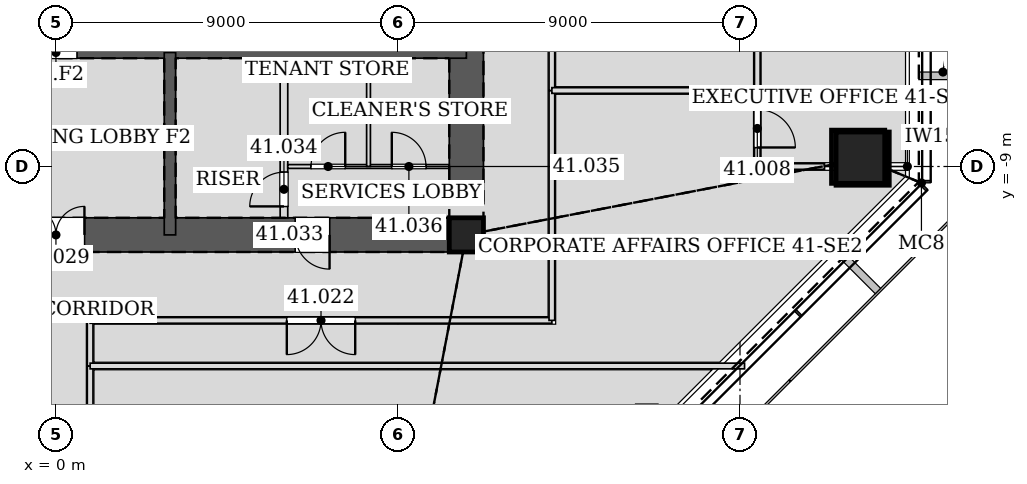
"""IFC4 building model, lengths in metres.
Left out: names, types, materials, properties, quantities, classifications, styles, units other than length and angle.
Written with IfcOpenShell. Run it as: python <this file> out.ifc"""

import sys

from ifc_helpers import new_model, si_unit, direction, frame, frame_2d, origin, origin_2d, place, context, subcontext, project, spatial, rectangle, hollow_rectangle, extrude, element, fill, save


model = new_model("IFC4")
c1 = context("Model", 3, precision=1e-05, world=origin(), true_north=direction((0.0, 1.0)))
c2 = subcontext(c1, "Body", "Model", "MODEL_VIEW")
j1 = project(units=[si_unit("LENGTHUNIT", "METRE"), si_unit("PLANEANGLEUNIT", "RADIAN")], contexts=[c1])
p1 = place(None, origin())
s1 = spatial("IfcSite", under=j1, at=p1, CompositionType="ELEMENT")
p2 = place(p1, origin())
s2 = spatial("IfcBuilding", under=s1, at=p2, CompositionType="ELEMENT")
p3 = place(p2, frame((0.0, 0.0, 180.6)))
s3 = spatial("IfcBuildingStorey", under=s2, at=p3, CompositionType="ELEMENT", Elevation=180.6)
p4 = place(p3, frame((21.228, -8.793, 0.0), z_axis=(-0.028237693676, 0.011678552323, 0.999533012997), x_axis=(-0.382183844423, -0.924086310396, 0.0)))
e1 = element("IfcColumn", 1, at=p4, inside=s3, PredefinedType="COLUMN", context=c2, shape_type="SweptSolid", body=[
    extrude(hollow_rectangle(XDim=1.4, YDim=1.4, WallThickness=0.065, at=origin_2d()), origin(), (0.0, 0.0, 1.0), 4.202),
])
p5 = place(p3, frame((15.631, -15.631, 0.0), z_axis=(-0.019988521213, 0.019988521213, 0.999600379171), x_axis=(-0.707106781187, -0.707106781187, 0.0)))
e2 = element("IfcColumn", 2, at=p5, inside=s3, PredefinedType="COLUMN", context=c2, shape_type="SweptSolid", body=[
    extrude(hollow_rectangle(XDim=0.5, YDim=0.5, WallThickness=0.025, at=origin_2d()), origin(), (0.0, 0.0, 1.0), 4.202),
])
p6 = place(p3, frame((10.8, -10.8, 0.0), z_axis=(0.0, 0.0, 1.0), x_axis=(1.0, 0.0, 0.0)))
e3 = element("IfcColumn", 3, at=p6, inside=s3, PredefinedType="COLUMN", context=c2, shape_type="SweptSolid", body=[
    extrude(hollow_rectangle(XDim=0.9, YDim=0.9, WallThickness=0.06, at=origin_2d()), origin(), (0.0, 0.0, 1.0), 4.2),
])
p7 = place(p3, frame((-10.8, -10.8, 0.0), z_axis=(0.0, 0.0, 1.0), x_axis=(1.0, 0.0, 0.0)))
e4 = element("IfcWall", 4, at=p7, inside=s3, PredefinedType="SOLIDWALL", context=c2, shape_type="SweptSolid", body=[
    extrude(rectangle(XDim=21.6, YDim=0.9, at=frame_2d((10.8, 0.0))), origin(), (0.0, 0.0, 1.0), 4.2),
])
p8 = place(p7, frame((10.05, 0.0, 0.0)))
e5 = element("IfcOpeningElement", 5, at=p8, cuts=e4, PredefinedType="OPENING", context=c2, shape_type="SweptSolid", body=[
    extrude(rectangle(XDim=1.5, YDim=2.1, at=frame_2d((0.75, 1.05))), frame((0.0, 0.46, 0.0), z_axis=(0.0, -1.0, 0.0), x_axis=(1.0, 0.0, 0.0)), (0.0, 0.0, 1.0), 0.92),
])
p9 = place(p7, frame((17.1, 0.0, 0.0)))
e6 = element("IfcOpeningElement", 6, at=p9, cuts=e4, PredefinedType="OPENING", context=c2, shape_type="SweptSolid", body=[
    extrude(rectangle(XDim=0.9, YDim=2.1, at=frame_2d((0.45, 1.05))), frame((0.0, 0.46, 0.0), z_axis=(0.0, -1.0, 0.0), x_axis=(1.0, 0.0, 0.0)), (0.0, 0.0, 1.0), 0.92),
])
p10 = place(p3, frame((10.8, -10.8, 0.0), z_axis=(0.0, 0.0, 1.0), x_axis=(0.0, 1.0, 0.0)))
e7 = element("IfcWall", 7, at=p10, inside=s3, PredefinedType="SOLIDWALL", context=c2, shape_type="SweptSolid", body=[
    extrude(rectangle(XDim=21.6, YDim=0.9, at=frame_2d((10.8, 0.0))), origin(), (0.0, 0.0, 1.0), 4.2),
])
p11 = place(p10, frame((11.7, 0.0, 0.0)))
e8 = element("IfcOpeningElement", 8, at=p11, cuts=e7, PredefinedType="OPENING", context=c2, shape_type="SweptSolid", body=[
    extrude(rectangle(XDim=1.2, YDim=2.1, at=frame_2d((0.6, 1.05))), frame((0.0, 0.46, 0.0), z_axis=(0.0, -1.0, 0.0), x_axis=(1.0, 0.0, 0.0)), (0.0, 0.0, 1.0), 0.92),
])
p12 = place(p10, frame((8.7, 0.0, 0.0)))
e9 = element("IfcOpeningElement", 9, at=p12, cuts=e7, PredefinedType="OPENING", context=c2, shape_type="SweptSolid", body=[
    extrude(rectangle(XDim=1.2, YDim=2.1, at=frame_2d((0.6, 1.05))), frame((0.0, 0.46, 0.0), z_axis=(0.0, -1.0, 0.0), x_axis=(1.0, 0.0, 0.0)), (0.0, 0.0, 1.0), 0.92),
])
p13 = place(p3, frame((-10.8, -6.0, 0.0), z_axis=(0.0, 0.0, 1.0), x_axis=(1.0, 0.0, 0.0)))
e10 = element("IfcWall", 10, at=p13, inside=s3, PredefinedType="SOLIDWALL", context=c2, shape_type="SweptSolid", body=[
    extrude(rectangle(XDim=21.6, YDim=0.3, at=frame_2d((10.8, 0.0))), origin(), (0.0, 0.0, 1.0), 4.2),
])
p14 = place(p13, frame((10.25, 0.0, 0.0)))
e11 = element("IfcOpeningElement", 11, at=p14, cuts=e10, PredefinedType="OPENING", context=c2, shape_type="SweptSolid", body=[
    extrude(rectangle(XDim=1.1, YDim=2.1, at=frame_2d((0.55, 1.05))), frame((0.0, 0.16, 0.0), z_axis=(0.0, -1.0, 0.0), x_axis=(1.0, 0.0, 0.0)), (0.0, 0.0, 1.0), 0.32),
])
p15 = place(p3, frame((3.0, -6.0, 0.0), z_axis=(0.0, 0.0, 1.0), x_axis=(0.0, -1.0, 0.0)))
e12 = element("IfcWall", 12, at=p15, inside=s3, PredefinedType="SOLIDWALL", context=c2, shape_type="SweptSolid", body=[
    extrude(rectangle(XDim=4.8, YDim=0.3, at=frame_2d((2.4, 0.0))), origin(), (0.0, 0.0, 1.0), 4.2),
])
p16 = place(p3, frame((0.9, -22.89, 0.0), z_axis=(0.0, 0.0, 1.0), x_axis=(0.0, 1.0, 0.0)))
e13 = element("IfcWall", 13, at=p16, inside=s3, PredefinedType="PARTITIONING", context=c2, shape_type="SweptSolid", body=[
    extrude(rectangle(XDim=8.641, YDim=0.15, at=frame_2d((4.32, 0.0))), origin(), (0.0, 0.0, 1.0), 3.426),
])
p17 = place(p16, frame((4.702, 0.0, 0.0)))
e14 = element("IfcOpeningElement", 14, at=p17, cuts=e13, PredefinedType="OPENING", context=c2, shape_type="SweptSolid", body=[
    extrude(rectangle(XDim=1.8, YDim=2.4, at=frame_2d((0.9, 1.2))), frame((0.0, 0.085, 0.0), z_axis=(0.0, -1.0, 0.0), x_axis=(1.0, 0.0, 0.0)), (0.0, 0.0, 1.0), 0.17),
])
p18 = place(p3, frame((0.9, -14.251, 0.0), z_axis=(0.0, 0.0, 1.0), x_axis=(0.0, 1.0, 0.0)))
e15 = element("IfcWall", 15, at=p18, inside=s3, PredefinedType="PARTITIONING", context=c2, shape_type="SweptSolid", body=[
    extrude(rectangle(XDim=1.201, YDim=0.15, at=frame_2d((0.601, 0.0))), origin(), (0.0, 0.0, 1.0), 3.426),
])
p19 = place(p3, frame((0.9, -13.05, 0.0), z_axis=(0.0, 0.0, 1.0), x_axis=(1.0, 0.0, 0.0)))
e16 = element("IfcWall", 16, at=p19, inside=s3, PredefinedType="PARTITIONING", context=c2, shape_type="SweptSolid", body=[
    extrude(rectangle(XDim=12.15, YDim=0.15, at=frame_2d((6.075, 0.0))), origin(), (0.0, 0.0, 1.0), 3.167),
])
p20 = place(p19, frame((5.175, 0.0, 0.0)))
e17 = element("IfcOpeningElement", 17, at=p20, cuts=e16, PredefinedType="OPENING", context=c2, shape_type="SweptSolid", body=[
    extrude(rectangle(XDim=1.8, YDim=2.4, at=frame_2d((0.9, 1.2))), frame((0.0, 0.085, 0.0), z_axis=(0.0, -1.0, 0.0), x_axis=(1.0, 0.0, 0.0)), (0.0, 0.0, 1.0), 0.17),
])
p21 = place(p3, frame((13.05, -13.05, 0.0), z_axis=(0.0, 0.0, 1.0), x_axis=(0.0, 1.0, 0.0)))
e18 = element("IfcWall", 18, at=p21, inside=s3, PredefinedType="PARTITIONING", context=c2, shape_type="SweptSolid", body=[
    extrude(rectangle(XDim=6.051, YDim=0.15, at=frame_2d((3.025, 0.0))), origin(), (0.0, 0.0, 1.0), 3.167),
])
p22 = place(p3, frame((13.05, -7.001, 0.0), z_axis=(0.0, 0.0, 1.0), x_axis=(0.0, 1.0, 0.0)))
e19 = element("IfcWall", 19, at=p22, inside=s3, PredefinedType="PARTITIONING", context=c2, shape_type="SweptSolid", body=[
    extrude(rectangle(XDim=2.502, YDim=0.15, at=frame_2d((1.251, 0.0))), origin(), (0.0, 0.0, 1.0), 4.035),
])
p23 = place(p3, frame((18.456, -6.999, 0.0), z_axis=(0.0, 0.0, 1.0), x_axis=(0.0, -1.0, 0.0)))
e20 = element("IfcWall", 20, at=p23, inside=s3, PredefinedType="PARTITIONING", context=c2, shape_type="SweptSolid", body=[
    extrude(rectangle(XDim=2.001, YDim=0.15, at=frame_2d((1.0, 0.0))), origin(), (0.0, 0.0, 1.0), 4.035),
])
p24 = place(p23, frame((0.5, 0.0, 0.0)))
e21 = element("IfcOpeningElement", 21, at=p24, cuts=e20, PredefinedType="OPENING", context=c2, shape_type="SweptSolid", body=[
    extrude(rectangle(XDim=1.0, YDim=2.1, at=frame_2d((0.5, 1.05))), frame((0.0, 0.085, 0.0), z_axis=(0.0, -1.0, 0.0), x_axis=(1.0, 0.0, 0.0)), (0.0, 0.0, 1.0), 0.17),
])
p25 = place(p3, frame((18.456, -9.0, 0.0), z_axis=(0.0, 0.0, 1.0), x_axis=(1.0, 0.0, 0.0)))
e22 = element("IfcWall", 22, at=p25, inside=s3, PredefinedType="PARTITIONING", context=c2, shape_type="SweptSolid", body=[
    extrude(rectangle(XDim=1.768, YDim=0.15, at=frame_2d((0.884, 0.0))), origin(), (0.0, 0.0, 1.0), 3.167),
])
p26 = place(p3, frame((21.92, -9.0, 0.0), z_axis=(0.0, 0.0, 1.0), x_axis=(1.0, 0.0, 0.0)))
e23 = element("IfcWall", 23, at=p26, inside=s3, PredefinedType="PARTITIONING", context=c2, shape_type="SweptSolid", body=[
    extrude(rectangle(XDim=0.967, YDim=0.15, at=frame_2d((0.484, 0.0))), origin(), (0.0, 0.0, 1.0), 4.035),
])
p27 = place(p3, frame((18.456, -7.001, 0.0), z_axis=(0.0, 0.0, 1.0), x_axis=(0.0, 1.0, 0.0)))
e24 = element("IfcWall", 24, at=p27, inside=s3, PredefinedType="PARTITIONING", context=c2, shape_type="SweptSolid", body=[
    extrude(rectangle(XDim=5.201, YDim=0.15, at=frame_2d((2.601, 0.0))), origin(), (0.0, 0.0, 1.0), 4.035),
])
p28 = place(p3, frame((18.12, -14.25, 0.0), z_axis=(0.0, 0.0, 1.0), x_axis=(-1.0, 0.0, 0.0)))
e25 = element("IfcWall", 25, at=p28, inside=s3, PredefinedType="PARTITIONING", context=c2, shape_type="SweptSolid", body=[
    extrude(rectangle(XDim=17.22, YDim=0.15, at=frame_2d((8.61, 0.0))), origin(), (0.0, 0.0, 1.0), 3.167),
])
p29 = place(p3, frame((18.456, -7.0, 0.0), z_axis=(0.0, 0.0, 1.0), x_axis=(-1.0, 0.0, 0.0)))
e26 = element("IfcWall", 26, at=p29, inside=s3, PredefinedType="PARTITIONING", context=c2, shape_type="SweptSolid", body=[
    extrude(rectangle(XDim=5.406, YDim=0.15, at=frame_2d((2.703, 0.0))), origin(), (0.0, 0.0, 1.0), 3.426),
])
p30 = place(p3, frame((6.0, -10.35, 0.0), z_axis=(0.0, 0.0, 1.0), x_axis=(0.0, 1.0, 0.0)))
e27 = element("IfcWall", 27, at=p30, inside=s3, PredefinedType="PARTITIONING", context=c2, shape_type="SweptSolid", body=[
    extrude(rectangle(XDim=4.2, YDim=0.2, at=frame_2d((2.1, 0.0))), origin(), (0.0, 0.0, 1.0), 4.035),
])
p31 = place(p30, frame((0.3, 0.0, 0.0)))
e28 = element("IfcOpeningElement", 28, at=p31, cuts=e27, PredefinedType="OPENING", context=c2, shape_type="SweptSolid", body=[
    extrude(rectangle(XDim=0.9, YDim=2.1, at=frame_2d((0.45, 1.05))), frame((0.0, 0.11, 0.0), z_axis=(0.0, -1.0, 0.0), x_axis=(1.0, 0.0, 0.0)), (0.0, 0.0, 1.0), 0.22),
])
p32 = place(p3, frame((6.1, -9.0, 0.0), z_axis=(0.0, 0.0, 1.0), x_axis=(1.0, 0.0, 0.0)))
e29 = element("IfcWall", 29, at=p32, inside=s3, PredefinedType="PARTITIONING", context=c2, shape_type="SweptSolid", body=[
    extrude(rectangle(XDim=4.25, YDim=0.1, at=frame_2d((2.125, 0.0))), origin(), (0.0, 0.0, 1.0), 4.035),
])
p33 = place(p32, frame((0.613, 0.0, 0.0)))
e30 = element("IfcOpeningElement", 30, at=p33, cuts=e29, PredefinedType="OPENING", context=c2, shape_type="SweptSolid", body=[
    extrude(rectangle(XDim=0.9, YDim=2.1, at=frame_2d((0.45, 1.05))), frame((0.0, 0.06, 0.0), z_axis=(0.0, -1.0, 0.0), x_axis=(1.0, 0.0, 0.0)), (0.0, 0.0, 1.0), 0.12),
])
p34 = place(p32, frame((2.738, 0.0, 0.0)))
e31 = element("IfcOpeningElement", 31, at=p34, cuts=e29, PredefinedType="OPENING", context=c2, shape_type="SweptSolid", body=[
    extrude(rectangle(XDim=0.9, YDim=2.1, at=frame_2d((0.45, 1.05))), frame((0.0, 0.06, 0.0), z_axis=(0.0, -1.0, 0.0), x_axis=(1.0, 0.0, 0.0)), (0.0, 0.0, 1.0), 0.12),
])
p35 = place(p3, frame((8.225, -9.0, 0.0), z_axis=(0.0, 0.0, 1.0), x_axis=(0.0, 1.0, 0.0)))
e32 = element("IfcWall", 32, at=p35, inside=s3, PredefinedType="PARTITIONING", context=c2, shape_type="SweptSolid", body=[
    extrude(rectangle(XDim=2.85, YDim=0.1, at=frame_2d((1.425, 0.0))), origin(), (0.0, 0.0, 1.0), 4.035),
])
p36 = place(p24, origin())
e33 = element("IfcDoor", 33, at=p36, inside=s3, OperationType="SINGLE_SWING_RIGHT", PredefinedType="DOOR", context=c2, shape_type="SweptSolid", body=[
    extrude(rectangle(XDim=1.0, YDim=2.1, at=frame_2d((0.5, 1.05))), frame((0.0, 0.025, 0.0), z_axis=(0.0, -1.0, 0.0), x_axis=(1.0, 0.0, 0.0)), (0.0, 0.0, 1.0), 0.05),
])
fill(e21, e33)
p37 = place(p20, frame((1.8, 0.0, 0.0), z_axis=(0.0, 0.0, 1.0), x_axis=(-1.0, 0.0, 0.0)))
e34 = element("IfcDoor", 34, at=p37, inside=s3, OperationType="DOUBLE_DOOR_SINGLE_SWING", PredefinedType="DOOR", context=c2, shape_type="SweptSolid", body=[
    extrude(rectangle(XDim=1.8, YDim=2.4, at=frame_2d((0.9, 1.2))), frame((0.0, 0.025, 0.0), z_axis=(0.0, -1.0, 0.0), x_axis=(1.0, 0.0, 0.0)), (0.0, 0.0, 1.0), 0.05),
])
fill(e17, e34)
p38 = place(p8, origin())
e35 = element("IfcDoor", 35, at=p38, inside=s3, OperationType="DOUBLE_DOOR_SINGLE_SWING", PredefinedType="DOOR", context=c2, shape_type="SweptSolid", body=[
    extrude(rectangle(XDim=1.5, YDim=2.1, at=frame_2d((0.75, 1.05))), frame((0.0, 0.025, 0.0), z_axis=(0.0, -1.0, 0.0), x_axis=(1.0, 0.0, 0.0)), (0.0, 0.0, 1.0), 0.05),
])
fill(e5, e35)
p39 = place(p9, frame((0.9, 0.0, 0.0), z_axis=(0.0, 0.0, 1.0), x_axis=(-1.0, 0.0, 0.0)))
e36 = element("IfcDoor", 36, at=p39, inside=s3, OperationType="SINGLE_SWING_LEFT", PredefinedType="DOOR", context=c2, shape_type="SweptSolid", body=[
    extrude(rectangle(XDim=0.9, YDim=2.1, at=frame_2d((0.45, 1.05))), frame((0.0, 0.025, 0.0), z_axis=(0.0, -1.0, 0.0), x_axis=(1.0, 0.0, 0.0)), (0.0, 0.0, 1.0), 0.05),
])
fill(e6, e36)
p40 = place(p31, origin())
e37 = element("IfcDoor", 37, at=p40, inside=s3, OperationType="SINGLE_SWING_LEFT", PredefinedType="DOOR", context=c2, shape_type="SweptSolid", body=[
    extrude(rectangle(XDim=0.9, YDim=2.1, at=frame_2d((0.45, 1.05))), frame((0.0, 0.025, 0.0), z_axis=(0.0, -1.0, 0.0), x_axis=(1.0, 0.0, 0.0)), (0.0, 0.0, 1.0), 0.05),
])
fill(e28, e37)
p41 = place(p33, origin())
e38 = element("IfcDoor", 38, at=p41, inside=s3, OperationType="SINGLE_SWING_RIGHT", PredefinedType="DOOR", context=c2, shape_type="SweptSolid", body=[
    extrude(rectangle(XDim=0.9, YDim=2.1, at=frame_2d((0.45, 1.05))), frame((0.0, 0.025, 0.0), z_axis=(0.0, -1.0, 0.0), x_axis=(1.0, 0.0, 0.0)), (0.0, 0.0, 1.0), 0.05),
])
fill(e30, e38)
p42 = place(p34, origin())
e39 = element("IfcDoor", 39, at=p42, inside=s3, OperationType="SINGLE_SWING_LEFT", PredefinedType="DOOR", context=c2, shape_type="SweptSolid", body=[
    extrude(rectangle(XDim=0.9, YDim=2.1, at=frame_2d((0.45, 1.05))), frame((0.0, 0.025, 0.0), z_axis=(0.0, -1.0, 0.0), x_axis=(1.0, 0.0, 0.0)), (0.0, 0.0, 1.0), 0.05),
])
fill(e31, e39)
p43 = place(p14, origin())
e40 = element("IfcDoor", 40, at=p43, inside=s3, OperationType="DOUBLE_DOOR_SLIDING", PredefinedType="DOOR", context=c2, shape_type="SweptSolid", body=[
    extrude(rectangle(XDim=1.1, YDim=2.1, at=frame_2d((0.55, 1.05))), frame((0.0, 0.025, 0.0), z_axis=(0.0, -1.0, 0.0), x_axis=(1.0, 0.0, 0.0)), (0.0, 0.0, 1.0), 0.05),
])
fill(e11, e40)
save(model, sys.argv[1])
